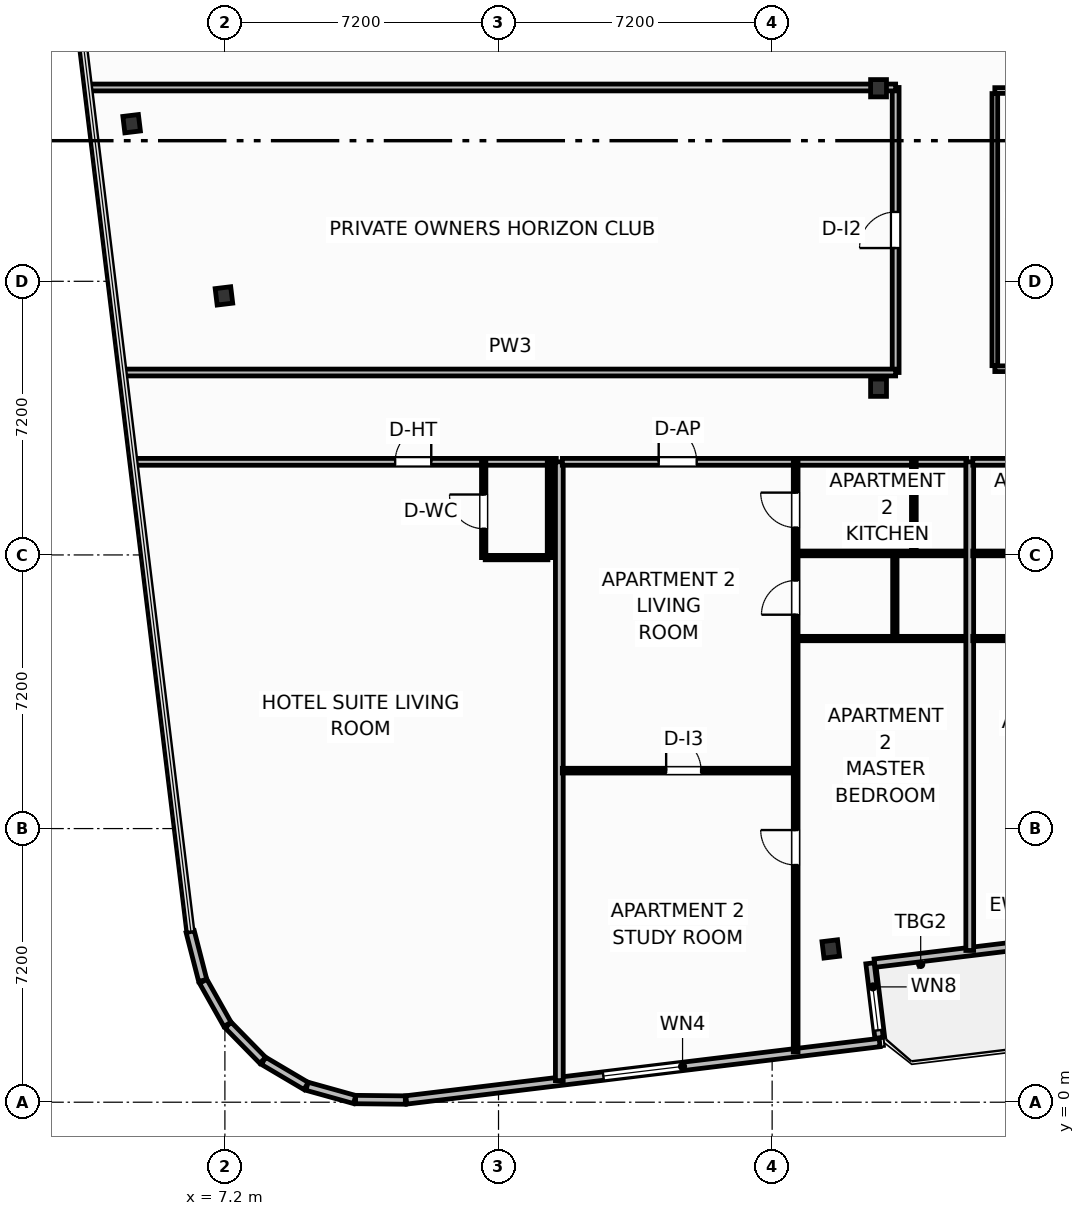
"""IFC4 building model, lengths in metres.
Left out: names, types, materials, properties, quantities, classifications, styles, units other than length and angle.
Written with IfcOpenShell. Run it as: python <this file> out.ifc"""

import sys

from ifc_helpers import new_model, si_unit, direction, frame, frame_2d, origin, origin_2d, place, context, subcontext, project, spatial, rectangle, i_section, extrude, element, fill, save


model = new_model("IFC4")
c1 = context("Model", 3, precision=1e-05, world=origin(), true_north=direction((0.0, 1.0)))
c2 = subcontext(c1, "Body", "Model", "MODEL_VIEW")
j1 = project(units=[si_unit("LENGTHUNIT", "METRE"), si_unit("PLANEANGLEUNIT", "RADIAN")], contexts=[c1])
p1 = place(None, origin())
s1 = spatial("IfcSite", under=j1, at=p1, CompositionType="ELEMENT")
p2 = place(p1, origin())
s2 = spatial("IfcBuilding", under=s1, at=p2, CompositionType="ELEMENT")
p3 = place(p2, frame((0.0, 0.0, 170.9)))
s3 = spatial("IfcBuildingStorey", under=s2, at=p3, CompositionType="ELEMENT", Elevation=170.9)
for number, where, z_axis, x_axis in (
    (1, (24.4, 18.8, 0.0), (0.0, 0.0, 1.0), (1.0, 0.0, 0.0)),
    (2, (24.4, 26.68, 0.0), (0.0, 0.0, 1.0), (1.0, 0.0, 0.0)),
):
    element("IfcColumn", number, at=place(p3, frame(where, z_axis=z_axis, x_axis=x_axis)), inside=s3, PredefinedType="COLUMN", context=c2, shape_type="SweptSolid", body=[
        extrude(i_section(OverallWidth=0.418, OverallDepth=0.455, WebThickness=0.042, FlangeThickness=0.068, FilletRadius=0.025, at=origin_2d()), origin(), (0.0, 0.0, 1.0), 3.7),
    ])
for number, where, z_axis, x_axis in (
    (3, (23.143, 4.033, 0.0), (0.0, 0.0, 1.0), (0.993, 0.12, 0.0)),
    (4, (4.746, 25.747, 0.0), (0.0, 0.0, 1.0), (0.993, 0.12, 0.0)),
    (5, (7.175, 21.216, 0.0), (0.0, 0.0, 1.0), (0.993, 0.12, 0.0)),
):
    element("IfcColumn", number, at=place(p3, frame(where, z_axis=z_axis, x_axis=x_axis)), inside=s3, PredefinedType="COLUMN", context=c2, shape_type="SweptSolid", body=[
        extrude(i_section(OverallWidth=0.412, OverallDepth=0.435, WebThickness=0.036, FlangeThickness=0.057, FilletRadius=0.025, at=origin_2d()), origin(), (0.0, 0.0, 1.0), 3.7),
    ])
p4 = place(p3, frame((30.252, 4.381, 0.0), z_axis=(0.0, 0.0, 1.0), x_axis=(-0.992735402148, -0.120318000826, 0.0)))
e6 = element("IfcWall", 6, at=p4, inside=s3, PredefinedType="SOLIDWALL", context=c2, shape_type="SweptSolid", body=[
    extrude(rectangle(XDim=6.0, YDim=0.22, at=frame_2d((3.0, 0.0))), origin(), (0.0, 0.0, 1.0), 2.73),
])
p5 = place(p4, frame((0.4, 0.0, 0.0)))
e7 = element("IfcOpeningElement", 7, at=p5, cuts=e6, PredefinedType="OPENING", context=c2, shape_type="SweptSolid", body=[
    extrude(rectangle(XDim=2.1, YDim=2.3, at=frame_2d((1.05, 1.15))), frame((0.0, 0.12, 0.0), z_axis=(0.0, -1.0, 0.0), x_axis=(1.0, 0.0, 0.0)), (0.0, 0.0, 1.0), 0.24),
])
p6 = place(p3, frame((6.286, 4.488, 0.0), z_axis=(0.0, 0.0, 1.0), x_axis=(0.248942347653, -0.968518305219, 0.0)))
e8 = element("IfcWall", 8, at=p6, inside=s3, PredefinedType="SOLIDWALL", context=c2, shape_type="SweptSolid", body=[
    extrude(rectangle(XDim=1.326, YDim=0.22, at=frame_2d((0.663, 0.0))), origin(), (0.0, 0.0, 1.0), 2.73),
])
for number, where, z_axis, x_axis in (
    (9, (6.629, 3.182, 0.0), (0.0, 0.0, 1.0), (0.491, -0.871, 0.0)),
    (10, (7.285, 2.031, 0.0), (0.0, 0.0, 1.0), (0.7, -0.714, 0.0)),
    (11, (8.217, 1.089, 0.0), (0.0, 0.0, 1.0), (0.861, -0.509, 0.0)),
):
    element("IfcWall", number, at=place(p3, frame(where, z_axis=z_axis, x_axis=x_axis)), inside=s3, PredefinedType="SOLIDWALL", context=c2, shape_type="SweptSolid", body=[
        extrude(rectangle(XDim=1.301, YDim=0.22, at=frame_2d((0.65, 0.0))), origin(), (0.0, 0.0, 1.0), 2.73),
    ])
p7 = place(p3, frame((9.361, 0.42, 0.0), z_axis=(0.0, 0.0, 1.0), x_axis=(0.963218895288, -0.268717992997, 0.0)))
e12 = element("IfcWall", 12, at=p7, inside=s3, PredefinedType="SOLIDWALL", context=c2, shape_type="SweptSolid", body=[
    extrude(rectangle(XDim=1.301, YDim=0.22, at=frame_2d((0.65, 0.0))), origin(), (0.0, 0.0, 1.0), 2.73),
])
p8 = place(p3, frame((10.639, 0.07, 0.0), z_axis=(0.0, 0.0, 1.0), x_axis=(0.999947377741, -0.010258740119, 0.0)))
e13 = element("IfcWall", 13, at=p8, inside=s3, PredefinedType="SOLIDWALL", context=c2, shape_type="SweptSolid", body=[
    extrude(rectangle(XDim=1.309, YDim=0.22, at=frame_2d((0.654, 0.0))), origin(), (0.0, 0.0, 1.0), 2.73),
])
p9 = place(p3, frame((11.972, 0.06, 0.0), z_axis=(0.0, 0.0, 1.0), x_axis=(0.992732021049, 0.120345894751, 0.0)))
e14 = element("IfcWall", 14, at=p9, inside=s3, PredefinedType="SOLIDWALL", context=c2, shape_type="SweptSolid", body=[
    extrude(rectangle(XDim=12.547, YDim=0.22, at=frame_2d((6.274, 0.0))), origin(), (0.0, 0.0, 1.0), 2.73),
])
p10 = place(p9, frame((5.224, 0.0, 0.8)))
e15 = element("IfcOpeningElement", 15, at=p10, cuts=e14, PredefinedType="OPENING", context=c2, shape_type="SweptSolid", body=[
    extrude(rectangle(XDim=2.1, YDim=1.75, at=frame_2d((1.05, 0.875))), frame((0.0, 0.12, 0.0), z_axis=(0.0, -1.0, 0.0), x_axis=(1.0, 0.0, 0.0)), (0.0, 0.0, 1.0), 0.24),
])
p11 = place(p3, frame((24.413, 1.694, 0.0), z_axis=(0.0, 0.0, 1.0), x_axis=(-0.120290754542, 0.992738703976, 0.0)))
e16 = element("IfcWall", 16, at=p11, inside=s3, PredefinedType="SOLIDWALL", context=c2, shape_type="SweptSolid", body=[
    extrude(rectangle(XDim=1.975, YDim=0.22, at=frame_2d((0.987, 0.0))), origin(), (0.0, 0.0, 1.0), 2.73),
])
p12 = place(p11, frame((0.2, 0.0, 0.8)))
e17 = element("IfcOpeningElement", 17, at=p12, cuts=e16, PredefinedType="OPENING", context=c2, shape_type="SweptSolid", body=[
    extrude(rectangle(XDim=1.15, YDim=1.4, at=frame_2d((0.575, 0.7))), frame((0.0, 0.12, 0.0), z_axis=(0.0, -1.0, 0.0), x_axis=(1.0, 0.0, 0.0)), (0.0, 0.0, 1.0), 0.24),
])
p13 = place(p3, frame((4.847, 16.85, 0.0), z_axis=(0.0, 0.0, 1.0), x_axis=(1.0, 0.0, 0.0)))
e18 = element("IfcWall", 18, at=p13, inside=s3, PredefinedType="PARTITIONING", context=c2, shape_type="SweptSolid", body=[
    extrude(rectangle(XDim=11.073, YDim=0.18, at=frame_2d((5.537, 0.0))), origin(), (0.0, 0.0, 1.0), 3.45),
])
p14 = place(p13, frame((6.833, 0.0, 0.0)))
e19 = element("IfcOpeningElement", 19, at=p14, cuts=e18, PredefinedType="OPENING", context=c2, shape_type="SweptSolid", body=[
    extrude(rectangle(XDim=0.95, YDim=2.15, at=frame_2d((0.475, 1.075))), frame((0.0, 0.1, 0.0), z_axis=(0.0, -1.0, 0.0), x_axis=(1.0, 0.0, 0.0)), (0.0, 0.0, 1.0), 0.2),
])
p15 = place(p3, frame((14.05, 14.33, 0.0), z_axis=(0.0, 0.0, 1.0), x_axis=(1.0, 0.0, 0.0)))
e20 = element("IfcWall", 20, at=p15, inside=s3, PredefinedType="PARTITIONING", context=c2, shape_type="SweptSolid", body=[
    extrude(rectangle(XDim=1.65, YDim=0.115, at=frame_2d((0.825, 0.0))), origin(), (0.0, 0.0, 1.0), 3.45),
])
p16 = place(p3, frame((14.01, 14.33, 0.0), z_axis=(0.0, 0.0, 1.0), x_axis=(0.0, 1.0, 0.0)))
e21 = element("IfcWall", 21, at=p16, inside=s3, PredefinedType="PARTITIONING", context=c2, shape_type="SweptSolid", body=[
    extrude(rectangle(XDim=2.52, YDim=0.115, at=frame_2d((1.26, 0.0))), origin(), (0.0, 0.0, 1.0), 3.45),
])
p17 = place(p16, frame((0.76, 0.0, 0.0)))
e22 = element("IfcOpeningElement", 22, at=p17, cuts=e21, PredefinedType="OPENING", context=c2, shape_type="SweptSolid", body=[
    extrude(rectangle(XDim=0.9, YDim=2.05, at=frame_2d((0.45, 1.025))), frame((0.0, 0.067, 0.0), z_axis=(0.0, -1.0, 0.0), x_axis=(1.0, 0.0, 0.0)), (0.0, 0.0, 1.0), 0.135),
])
p18 = place(p3, frame((15.74, 14.33, 0.0), z_axis=(0.0, 0.0, 1.0), x_axis=(0.0, 1.0, 0.0)))
e23 = element("IfcWall", 23, at=p18, inside=s3, PredefinedType="PARTITIONING", context=c2, shape_type="SweptSolid", body=[
    extrude(rectangle(XDim=2.52, YDim=0.115, at=frame_2d((1.26, 0.0))), origin(), (0.0, 0.0, 1.0), 3.45),
])
p19 = place(p3, frame((16.0, 0.568, 0.0), z_axis=(0.0, 0.0, 1.0), x_axis=(0.0, 1.0, 0.0)))
e24 = element("IfcWall", 24, at=p19, inside=s3, PredefinedType="PARTITIONING", context=c2, shape_type="SweptSolid", body=[
    extrude(rectangle(XDim=16.282, YDim=0.205, at=frame_2d((8.141, 0.0))), origin(), (0.0, 0.0, 1.0), 3.45),
])
p20 = place(p3, frame((16.08, 8.724, 0.0), z_axis=(0.0, 0.0, 1.0), x_axis=(1.0, 0.0, 0.0)))
e25 = element("IfcWall", 25, at=p20, inside=s3, PredefinedType="PARTITIONING", context=c2, shape_type="SweptSolid", body=[
    extrude(rectangle(XDim=6.069, YDim=0.125, at=frame_2d((3.035, 0.0))), origin(), (0.0, 0.0, 1.0), 3.45),
])
p21 = place(p20, frame((2.731, 0.0, 0.0)))
e26 = element("IfcOpeningElement", 26, at=p21, cuts=e25, PredefinedType="OPENING", context=c2, shape_type="SweptSolid", body=[
    extrude(rectangle(XDim=0.92, YDim=2.05, at=frame_2d((0.46, 1.025))), frame((0.0, 0.073, 0.0), z_axis=(0.0, -1.0, 0.0), x_axis=(1.0, 0.0, 0.0)), (0.0, 0.0, 1.0), 0.145),
])
p22 = place(p3, frame((16.08, 16.85, 0.0), z_axis=(0.0, 0.0, 1.0), x_axis=(1.0, 0.0, 0.0)))
e27 = element("IfcWall", 27, at=p22, inside=s3, PredefinedType="PARTITIONING", context=c2, shape_type="SweptSolid", body=[
    extrude(rectangle(XDim=10.64, YDim=0.18, at=frame_2d((5.32, 0.0))), origin(), (0.0, 0.0, 1.0), 3.45),
])
p23 = place(p22, frame((2.535, 0.0, 0.0)))
e28 = element("IfcOpeningElement", 28, at=p23, cuts=e27, PredefinedType="OPENING", context=c2, shape_type="SweptSolid", body=[
    extrude(rectangle(XDim=1.0, YDim=2.2, at=frame_2d((0.5, 1.1))), frame((0.0, 0.1, 0.0), z_axis=(0.0, -1.0, 0.0), x_axis=(1.0, 0.0, 0.0)), (0.0, 0.0, 1.0), 0.2),
])
p24 = place(p3, frame((22.219, 1.322, 0.0), z_axis=(0.0, 0.0, 1.0), x_axis=(0.0, 1.0, 0.0)))
e29 = element("IfcWall", 29, at=p24, inside=s3, PredefinedType="PARTITIONING", context=c2, shape_type="SweptSolid", body=[
    extrude(rectangle(XDim=15.528, YDim=0.125, at=frame_2d((7.764, 0.0))), origin(), (0.0, 0.0, 1.0), 3.45),
])
p25 = place(p24, frame((4.919, 0.0, 0.0)))
e30 = element("IfcOpeningElement", 30, at=p25, cuts=e29, PredefinedType="OPENING", context=c2, shape_type="SweptSolid", body=[
    extrude(rectangle(XDim=0.92, YDim=2.05, at=frame_2d((0.46, 1.025))), frame((0.0, 0.073, 0.0), z_axis=(0.0, -1.0, 0.0), x_axis=(1.0, 0.0, 0.0)), (0.0, 0.0, 1.0), 0.145),
])
p26 = place(p24, frame((11.505, 0.0, 0.0)))
e31 = element("IfcOpeningElement", 31, at=p26, cuts=e29, PredefinedType="OPENING", context=c2, shape_type="SweptSolid", body=[
    extrude(rectangle(XDim=0.9, YDim=2.05, at=frame_2d((0.45, 1.025))), frame((0.0, 0.073, 0.0), z_axis=(0.0, -1.0, 0.0), x_axis=(1.0, 0.0, 0.0)), (0.0, 0.0, 1.0), 0.145),
])
p27 = place(p24, frame((13.798, 0.0, 0.0)))
e32 = element("IfcOpeningElement", 32, at=p27, cuts=e29, PredefinedType="OPENING", context=c2, shape_type="SweptSolid", body=[
    extrude(rectangle(XDim=0.92, YDim=2.05, at=frame_2d((0.46, 1.025))), frame((0.0, 0.073, 0.0), z_axis=(0.0, -1.0, 0.0), x_axis=(1.0, 0.0, 0.0)), (0.0, 0.0, 1.0), 0.145),
])
p28 = place(p3, frame((22.289, 14.44, 0.0), z_axis=(0.0, 0.0, 1.0), x_axis=(1.0, 0.0, 0.0)))
e33 = element("IfcWall", 33, at=p28, inside=s3, PredefinedType="PARTITIONING", context=c2, shape_type="SweptSolid", body=[
    extrude(rectangle(XDim=4.431, YDim=0.125, at=frame_2d((2.215, 0.0))), origin(), (0.0, 0.0, 1.0), 3.45),
])
p29 = place(p3, frame((22.289, 12.2, 0.0), z_axis=(0.0, 0.0, 1.0), x_axis=(1.0, 0.0, 0.0)))
e34 = element("IfcWall", 34, at=p29, inside=s3, PredefinedType="PARTITIONING", context=c2, shape_type="SweptSolid", body=[
    extrude(rectangle(XDim=4.431, YDim=0.115, at=frame_2d((2.215, 0.0))), origin(), (0.0, 0.0, 1.0), 3.45),
])
p30 = place(p3, frame((25.329, 14.44, 0.0), z_axis=(0.0, 0.0, 1.0), x_axis=(0.0, 1.0, 0.0)))
e35 = element("IfcWall", 35, at=p30, inside=s3, PredefinedType="PARTITIONING", context=c2, shape_type="SweptSolid", body=[
    extrude(rectangle(XDim=2.41, YDim=0.125, at=frame_2d((1.205, 0.0))), origin(), (0.0, 0.0, 1.0), 3.45),
])
p31 = place(p3, frame((24.829, 12.2, 0.0), z_axis=(0.0, 0.0, 1.0), x_axis=(0.0, 1.0, 0.0)))
e36 = element("IfcWall", 36, at=p31, inside=s3, PredefinedType="PARTITIONING", context=c2, shape_type="SweptSolid", body=[
    extrude(rectangle(XDim=2.24, YDim=0.115, at=frame_2d((1.12, 0.0))), origin(), (0.0, 0.0, 1.0), 3.45),
])
p32 = place(p3, frame((26.8, 3.993, 0.0), z_axis=(0.0, 0.0, 1.0), x_axis=(0.0, 1.0, 0.0)))
e37 = element("IfcWall", 37, at=p32, inside=s3, PredefinedType="PARTITIONING", context=c2, shape_type="SweptSolid", body=[
    extrude(rectangle(XDim=12.857, YDim=0.205, at=frame_2d((6.429, 0.0))), origin(), (0.0, 0.0, 1.0), 3.45),
])
p33 = place(p3, frame((26.88, 16.85, 0.0), z_axis=(0.0, 0.0, 1.0), x_axis=(1.0, 0.0, 0.0)))
e38 = element("IfcWall", 38, at=p33, inside=s3, PredefinedType="PARTITIONING", context=c2, shape_type="SweptSolid", body=[
    extrude(rectangle(XDim=10.64, YDim=0.18, at=frame_2d((5.32, 0.0))), origin(), (0.0, 0.0, 1.0), 3.45),
])
p34 = place(p33, frame((7.105, 0.0, 0.0)))
e39 = element("IfcOpeningElement", 39, at=p34, cuts=e38, PredefinedType="OPENING", context=c2, shape_type="SweptSolid", body=[
    extrude(rectangle(XDim=1.0, YDim=2.2, at=frame_2d((0.5, 1.1))), frame((0.0, 0.1, 0.0), z_axis=(0.0, -1.0, 0.0), x_axis=(1.0, 0.0, 0.0)), (0.0, 0.0, 1.0), 0.2),
])
p35 = place(p3, frame((26.88, 14.44, 0.0), z_axis=(0.0, 0.0, 1.0), x_axis=(1.0, 0.0, 0.0)))
e40 = element("IfcWall", 40, at=p35, inside=s3, PredefinedType="PARTITIONING", context=c2, shape_type="SweptSolid", body=[
    extrude(rectangle(XDim=4.431, YDim=0.125, at=frame_2d((2.215, 0.0))), origin(), (0.0, 0.0, 1.0), 3.45),
])
p36 = place(p3, frame((26.88, 12.2, 0.0), z_axis=(0.0, 0.0, 1.0), x_axis=(1.0, 0.0, 0.0)))
e41 = element("IfcWall", 41, at=p36, inside=s3, PredefinedType="PARTITIONING", context=c2, shape_type="SweptSolid", body=[
    extrude(rectangle(XDim=4.431, YDim=0.115, at=frame_2d((2.215, 0.0))), origin(), (0.0, 0.0, 1.0), 3.45),
])
p37 = place(p3, frame((24.85, 19.2, 0.0), z_axis=(0.0, 0.0, 1.0), x_axis=(0.0, 1.0, 0.0)))
e42 = element("IfcWall", 42, at=p37, inside=s3, PredefinedType="PARTITIONING", context=c2, shape_type="SweptSolid", body=[
    extrude(rectangle(XDim=7.5, YDim=0.18, at=frame_2d((3.75, 0.0))), origin(), (0.0, 0.0, 1.0), 3.45),
])
p38 = place(p37, frame((3.275, 0.0, 0.0)))
e43 = element("IfcOpeningElement", 43, at=p38, cuts=e42, PredefinedType="OPENING", context=c2, shape_type="SweptSolid", body=[
    extrude(rectangle(XDim=0.95, YDim=2.05, at=frame_2d((0.475, 1.025))), frame((0.0, 0.1, 0.0), z_axis=(0.0, -1.0, 0.0), x_axis=(1.0, 0.0, 0.0)), (0.0, 0.0, 1.0), 0.2),
])
p39 = place(p3, frame((4.562, 19.2, 0.0), z_axis=(0.0, 0.0, 1.0), x_axis=(1.0, 0.0, 0.0)))
e44 = element("IfcWall", 44, at=p39, inside=s3, PredefinedType="PARTITIONING", context=c2, shape_type="SweptSolid", body=[
    extrude(rectangle(XDim=20.288, YDim=0.18, at=frame_2d((10.144, 0.0))), origin(), (0.0, 0.0, 1.0), 3.45),
])
p40 = place(p3, frame((3.653, 26.7, 0.0), z_axis=(0.0, 0.0, 1.0), x_axis=(1.0, 0.0, 0.0)))
e45 = element("IfcWall", 45, at=p40, inside=s3, PredefinedType="PARTITIONING", context=c2, shape_type="SweptSolid", body=[
    extrude(rectangle(XDim=21.197, YDim=0.18, at=frame_2d((10.599, 0.0))), origin(), (0.0, 0.0, 1.0), 2.662),
])
p41 = place(p3, frame((27.46, 26.62, 0.0), z_axis=(0.0, 0.0, 1.0), x_axis=(1.0, 0.0, 0.0)))
e46 = element("IfcWall", 46, at=p41, inside=s3, PredefinedType="PARTITIONING", context=c2, shape_type="SweptSolid", body=[
    extrude(rectangle(XDim=6.1, YDim=0.15, at=frame_2d((3.05, 0.0))), origin(), (0.0, 0.0, 1.0), 2.662),
])
p42 = place(p41, frame((0.9, 0.0, 0.0)))
e47 = element("IfcOpeningElement", 47, at=p42, cuts=e46, PredefinedType="OPENING", context=c2, shape_type="SweptSolid", body=[
    extrude(rectangle(XDim=0.95, YDim=2.05, at=frame_2d((0.475, 1.025))), frame((0.0, 0.085, 0.0), z_axis=(0.0, -1.0, 0.0), x_axis=(1.0, 0.0, 0.0)), (0.0, 0.0, 1.0), 0.17),
])
p43 = place(p41, frame((4.303, 0.0, 0.0)))
e48 = element("IfcOpeningElement", 48, at=p43, cuts=e46, PredefinedType="OPENING", context=c2, shape_type="SweptSolid", body=[
    extrude(rectangle(XDim=0.9, YDim=2.05, at=frame_2d((0.45, 1.025))), frame((0.0, 0.085, 0.0), z_axis=(0.0, -1.0, 0.0), x_axis=(1.0, 0.0, 0.0)), (0.0, 0.0, 1.0), 0.17),
])
p44 = place(p3, frame((27.46, 19.3, 0.0), z_axis=(0.0, 0.0, 1.0), x_axis=(1.0, 0.0, 0.0)))
e49 = element("IfcWall", 49, at=p44, inside=s3, PredefinedType="PARTITIONING", context=c2, shape_type="SweptSolid", body=[
    extrude(rectangle(XDim=6.1, YDim=0.15, at=frame_2d((3.05, 0.0))), origin(), (0.0, 0.0, 1.0), 2.662),
])
p45 = place(p3, frame((27.46, 19.38, 0.0), z_axis=(0.0, 0.0, 1.0), x_axis=(0.0, 1.0, 0.0)))
e50 = element("IfcWall", 50, at=p45, inside=s3, PredefinedType="PARTITIONING", context=c2, shape_type="SweptSolid", body=[
    extrude(rectangle(XDim=7.16, YDim=0.15, at=frame_2d((3.58, 0.0))), origin(), (0.0, 0.0, 1.0), 3.45),
])
p46 = place(p10, origin())
e51 = element("IfcWindow", 51, at=p46, inside=s3, PartitioningType="SINGLE_PANEL", PredefinedType="WINDOW", context=c2, shape_type="SweptSolid", body=[
    extrude(rectangle(XDim=2.1, YDim=1.75, at=frame_2d((1.05, 0.875))), frame((0.0, 0.03, 0.0), z_axis=(0.0, -1.0, 0.0), x_axis=(1.0, 0.0, 0.0)), (0.0, 0.0, 1.0), 0.06),
])
fill(e15, e51)
p47 = place(p14, origin())
e52 = element("IfcDoor", 52, at=p47, inside=s3, OperationType="SINGLE_SWING_RIGHT", PredefinedType="DOOR", context=c2, shape_type="SweptSolid", body=[
    extrude(rectangle(XDim=0.95, YDim=2.15, at=frame_2d((0.475, 1.075))), frame((0.0, 0.025, 0.0), z_axis=(0.0, -1.0, 0.0), x_axis=(1.0, 0.0, 0.0)), (0.0, 0.0, 1.0), 0.05),
])
fill(e19, e52)
p48 = place(p17, origin())
e53 = element("IfcDoor", 53, at=p48, inside=s3, OperationType="SINGLE_SWING_RIGHT", PredefinedType="DOOR", context=c2, shape_type="SweptSolid", body=[
    extrude(rectangle(XDim=0.9, YDim=2.05, at=frame_2d((0.45, 1.025))), frame((0.0, 0.025, 0.0), z_axis=(0.0, -1.0, 0.0), x_axis=(1.0, 0.0, 0.0)), (0.0, 0.0, 1.0), 0.05),
])
fill(e22, e53)
p49 = place(p21, origin())
e54 = element("IfcDoor", 54, at=p49, inside=s3, OperationType="SINGLE_SWING_LEFT", PredefinedType="DOOR", context=c2, shape_type="SweptSolid", body=[
    extrude(rectangle(XDim=0.92, YDim=2.05, at=frame_2d((0.46, 1.025))), frame((0.0, 0.025, 0.0), z_axis=(0.0, -1.0, 0.0), x_axis=(1.0, 0.0, 0.0)), (0.0, 0.0, 1.0), 0.05),
])
fill(e26, e54)
p50 = place(p23, origin())
e55 = element("IfcDoor", 55, at=p50, inside=s3, OperationType="SINGLE_SWING_LEFT", PredefinedType="DOOR", context=c2, shape_type="SweptSolid", body=[
    extrude(rectangle(XDim=1.0, YDim=2.2, at=frame_2d((0.5, 1.1))), frame((0.0, 0.025, 0.0), z_axis=(0.0, -1.0, 0.0), x_axis=(1.0, 0.0, 0.0)), (0.0, 0.0, 1.0), 0.05),
])
fill(e28, e55)
p51 = place(p25, origin())
e56 = element("IfcDoor", 56, at=p51, inside=s3, OperationType="SINGLE_SWING_RIGHT", PredefinedType="DOOR", context=c2, shape_type="SweptSolid", body=[
    extrude(rectangle(XDim=0.92, YDim=2.05, at=frame_2d((0.46, 1.025))), frame((0.0, 0.025, 0.0), z_axis=(0.0, -1.0, 0.0), x_axis=(1.0, 0.0, 0.0)), (0.0, 0.0, 1.0), 0.05),
])
fill(e30, e56)
p52 = place(p26, origin())
e57 = element("IfcDoor", 57, at=p52, inside=s3, OperationType="SINGLE_SWING_LEFT", PredefinedType="DOOR", context=c2, shape_type="SweptSolid", body=[
    extrude(rectangle(XDim=0.9, YDim=2.05, at=frame_2d((0.45, 1.025))), frame((0.0, 0.025, 0.0), z_axis=(0.0, -1.0, 0.0), x_axis=(1.0, 0.0, 0.0)), (0.0, 0.0, 1.0), 0.05),
])
fill(e31, e57)
p53 = place(p27, origin())
e58 = element("IfcDoor", 58, at=p53, inside=s3, OperationType="SINGLE_SWING_RIGHT", PredefinedType="DOOR", context=c2, shape_type="SweptSolid", body=[
    extrude(rectangle(XDim=0.92, YDim=2.05, at=frame_2d((0.46, 1.025))), frame((0.0, 0.025, 0.0), z_axis=(0.0, -1.0, 0.0), x_axis=(1.0, 0.0, 0.0)), (0.0, 0.0, 1.0), 0.05),
])
fill(e32, e58)
p54 = place(p38, origin())
e59 = element("IfcDoor", 59, at=p54, inside=s3, OperationType="SINGLE_SWING_LEFT", PredefinedType="DOOR", context=c2, shape_type="SweptSolid", body=[
    extrude(rectangle(XDim=0.95, YDim=2.05, at=frame_2d((0.475, 1.025))), frame((0.0, 0.025, 0.0), z_axis=(0.0, -1.0, 0.0), x_axis=(1.0, 0.0, 0.0)), (0.0, 0.0, 1.0), 0.05),
])
fill(e43, e59)
p55 = place(p12, origin())
e60 = element("IfcWindow", 60, at=p55, inside=s3, PartitioningType="SINGLE_PANEL", PredefinedType="WINDOW", context=c2, shape_type="SweptSolid", body=[
    extrude(rectangle(XDim=1.15, YDim=1.4, at=frame_2d((0.575, 0.7))), frame((0.0, 0.03, 0.0), z_axis=(0.0, -1.0, 0.0), x_axis=(1.0, 0.0, 0.0)), (0.0, 0.0, 1.0), 0.06),
])
fill(e17, e60)
save(model, sys.argv[1])
